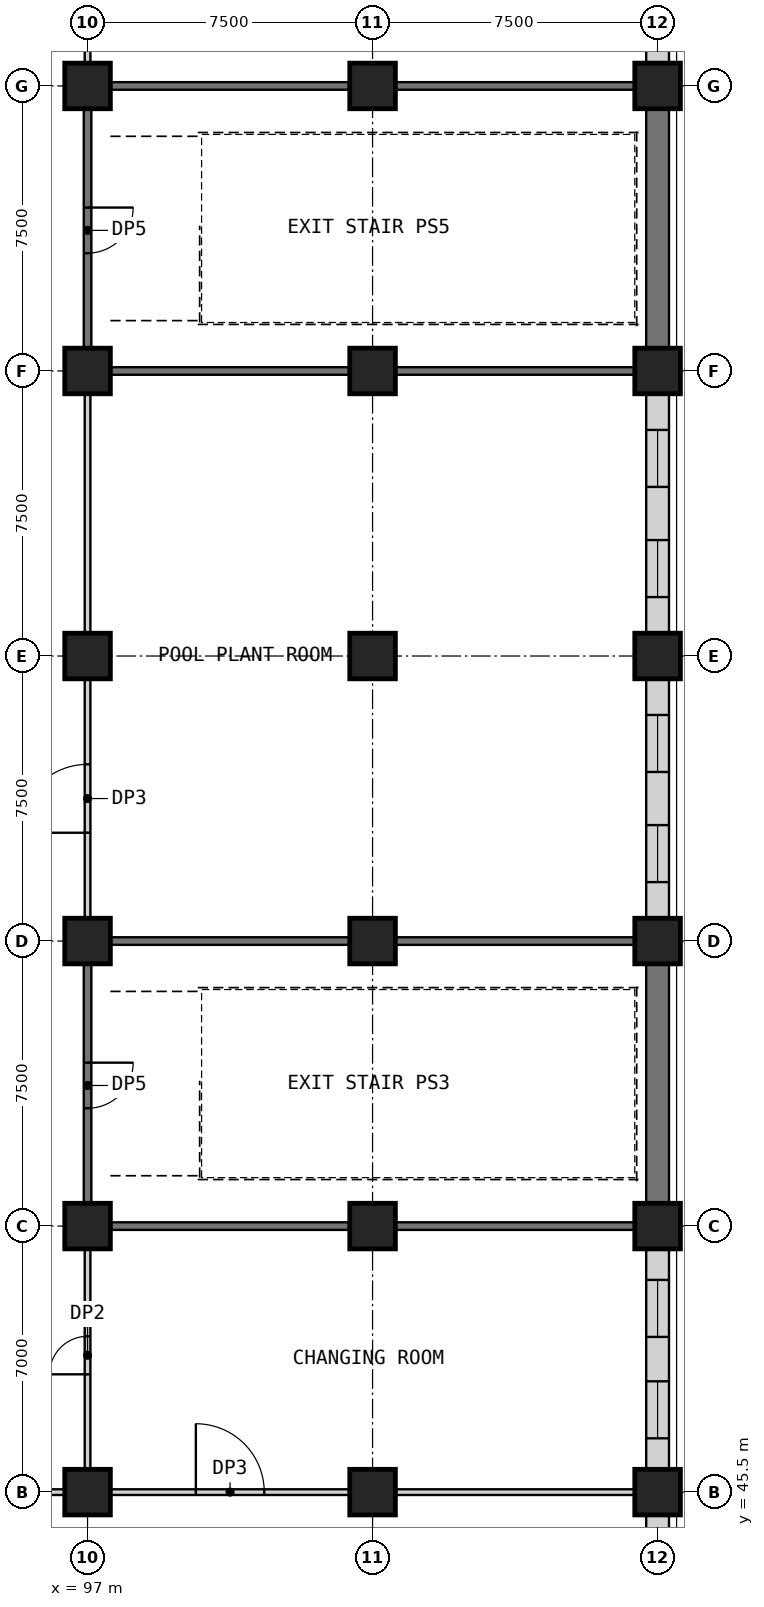
"""IFC4 building model, lengths in metres.
Left out: names, types, materials, properties, quantities, classifications, styles, units other than length and angle.
Written with IfcOpenShell. Run it as: python <this file> out.ifc"""

import sys

from ifc_helpers import new_model, si_unit, direction, frame, frame_2d, origin, origin_2d, place, context, subcontext, project, spatial, rectangle, extrude, element, fill, save


model = new_model("IFC4")
c1 = context("Model", 3, precision=1e-05, world=origin(), true_north=direction((0.0, 1.0)))
c2 = subcontext(c1, "Body", "Model", "MODEL_VIEW")
j1 = project(units=[si_unit("LENGTHUNIT", "METRE"), si_unit("PLANEANGLEUNIT", "RADIAN")], contexts=[c1])
p1 = place(None, origin())
s1 = spatial("IfcSite", under=j1, at=p1, CompositionType="ELEMENT")
p2 = place(p1, origin())
s2 = spatial("IfcBuilding", under=s1, at=p2, CompositionType="ELEMENT")
p3 = place(p2, frame((0.0, 0.0, 29.0)))
s3 = spatial("IfcBuildingStorey", under=s2, at=p3, CompositionType="ELEMENT", Elevation=29.0)
for number, where, z_axis, x_axis in (
    (1, (97.0, 45.5, 0.0), (0.0, 0.0, 1.0), (1.0, 0.0, 0.0)),
    (2, (97.0, 52.5, 0.0), (0.0, 0.0, 1.0), (1.0, 0.0, 0.0)),
    (3, (97.0, 60.0, 0.0), (0.0, 0.0, 1.0), (1.0, 0.0, 0.0)),
    (4, (97.0, 67.5, 0.0), (0.0, 0.0, 1.0), (1.0, 0.0, 0.0)),
    (5, (97.0, 75.0, 0.0), (0.0, 0.0, 1.0), (1.0, 0.0, 0.0)),
    (6, (97.0, 82.5, 0.0), (0.0, 0.0, 1.0), (1.0, 0.0, 0.0)),
    (7, (104.5, 45.5, 0.0), (0.0, 0.0, 1.0), (1.0, 0.0, 0.0)),
    (8, (104.5, 52.5, 0.0), (0.0, 0.0, 1.0), (1.0, 0.0, 0.0)),
    (9, (104.5, 60.0, 0.0), (0.0, 0.0, 1.0), (1.0, 0.0, 0.0)),
    (10, (104.5, 67.5, 0.0), (0.0, 0.0, 1.0), (1.0, 0.0, 0.0)),
    (11, (104.5, 75.0, 0.0), (0.0, 0.0, 1.0), (1.0, 0.0, 0.0)),
    (12, (104.5, 82.5, 0.0), (0.0, 0.0, 1.0), (1.0, 0.0, 0.0)),
    (13, (112.0, 45.5, 0.0), (0.0, 0.0, 1.0), (1.0, 0.0, 0.0)),
    (14, (112.0, 52.5, 0.0), (0.0, 0.0, 1.0), (1.0, 0.0, 0.0)),
    (15, (112.0, 60.0, 0.0), (0.0, 0.0, 1.0), (1.0, 0.0, 0.0)),
    (16, (112.0, 67.5, 0.0), (0.0, 0.0, 1.0), (1.0, 0.0, 0.0)),
    (17, (112.0, 75.0, 0.0), (0.0, 0.0, 1.0), (1.0, 0.0, 0.0)),
    (18, (112.0, 82.5, 0.0), (0.0, 0.0, 1.0), (1.0, 0.0, 0.0)),
):
    element("IfcColumn", number, at=place(p3, frame(where, z_axis=z_axis, x_axis=x_axis)), inside=s3, PredefinedType="COLUMN", context=c2, shape_type="SweptSolid", body=[
        extrude(rectangle(XDim=1.2, YDim=1.2, at=origin_2d()), origin(), (0.0, 0.0, 1.0), 5.0),
    ])
p4 = place(p3, frame((90.0, 45.5, 0.0), z_axis=(0.0, 0.0, 1.0), x_axis=(1.0, 0.0, 0.0)))
e19 = element("IfcWall", 19, at=p4, inside=s3, PredefinedType="PARTITIONING", context=c2, shape_type="SweptSolid", body=[
    extrude(rectangle(XDim=6.4, YDim=0.15, at=frame_2d((3.2, 0.0))), origin(), (0.0, 0.0, 1.0), 4.7),
])
p5 = place(p3, frame((97.6, 45.5, 0.0), z_axis=(0.0, 0.0, 1.0), x_axis=(1.0, 0.0, 0.0)))
e20 = element("IfcWall", 20, at=p5, inside=s3, PredefinedType="PARTITIONING", context=c2, shape_type="SweptSolid", body=[
    extrude(rectangle(XDim=6.3, YDim=0.15, at=frame_2d((3.15, 0.0))), origin(), (0.0, 0.0, 1.0), 4.7),
])
p6 = place(p5, frame((2.25, 0.0, 0.0)))
e21 = element("IfcOpeningElement", 21, at=p6, cuts=e20, PredefinedType="OPENING", context=c2, shape_type="SweptSolid", body=[
    extrude(rectangle(XDim=1.8, YDim=2.4, at=frame_2d((0.9, 1.2))), frame((0.0, 0.085, 0.0), z_axis=(0.0, -1.0, 0.0), x_axis=(1.0, 0.0, 0.0)), (0.0, 0.0, 1.0), 0.17),
])
p7 = place(p3, frame((105.1, 45.5, 0.0), z_axis=(0.0, 0.0, 1.0), x_axis=(1.0, 0.0, 0.0)))
e22 = element("IfcWall", 22, at=p7, inside=s3, PredefinedType="PARTITIONING", context=c2, shape_type="SweptSolid", body=[
    extrude(rectangle(XDim=6.3, YDim=0.15, at=frame_2d((3.15, 0.0))), origin(), (0.0, 0.0, 1.0), 4.7),
])
for number, where, z_axis, x_axis in (
    (23, (97.6, 52.5, 0.0), (0.0, 0.0, 1.0), (1.0, 0.0, 0.0)),
    (24, (105.1, 52.5, 0.0), (0.0, 0.0, 1.0), (1.0, 0.0, 0.0)),
    (25, (97.6, 60.0, 0.0), (0.0, 0.0, 1.0), (1.0, 0.0, 0.0)),
    (26, (105.1, 60.0, 0.0), (0.0, 0.0, 1.0), (1.0, 0.0, 0.0)),
    (27, (97.6, 75.0, 0.0), (0.0, 0.0, 1.0), (1.0, 0.0, 0.0)),
    (28, (105.1, 75.0, 0.0), (0.0, 0.0, 1.0), (1.0, 0.0, 0.0)),
    (29, (97.6, 82.5, 0.0), (0.0, 0.0, 1.0), (1.0, 0.0, 0.0)),
    (30, (105.1, 82.5, 0.0), (0.0, 0.0, 1.0), (1.0, 0.0, 0.0)),
):
    element("IfcWall", number, at=place(p3, frame(where, z_axis=z_axis, x_axis=x_axis)), inside=s3, PredefinedType="SHEAR", context=c2, shape_type="SweptSolid", body=[
        extrude(rectangle(XDim=6.3, YDim=0.2, at=frame_2d((3.15, 0.0))), origin(), (0.0, 0.0, 1.0), 4.7),
    ])
p8 = place(p3, frame((97.0, 46.1, 0.0), z_axis=(0.0, 0.0, 1.0), x_axis=(0.0, 1.0, 0.0)))
e31 = element("IfcWall", 31, at=p8, inside=s3, PredefinedType="PARTITIONING", context=c2, shape_type="SweptSolid", body=[
    extrude(rectangle(XDim=5.8, YDim=0.15, at=frame_2d((2.9, 0.0))), origin(), (0.0, 0.0, 1.0), 4.7),
])
p9 = place(p8, frame((2.5, 0.0, 0.0)))
e32 = element("IfcOpeningElement", 32, at=p9, cuts=e31, PredefinedType="OPENING", context=c2, shape_type="SweptSolid", body=[
    extrude(rectangle(XDim=1.0, YDim=2.1, at=frame_2d((0.5, 1.05))), frame((0.0, 0.085, 0.0), z_axis=(0.0, -1.0, 0.0), x_axis=(1.0, 0.0, 0.0)), (0.0, 0.0, 1.0), 0.17),
])
p10 = place(p3, frame((97.0, 59.4, 0.0), z_axis=(0.0, 0.0, 1.0), x_axis=(0.0, -1.0, 0.0)))
e33 = element("IfcWall", 33, at=p10, inside=s3, PredefinedType="SHEAR", context=c2, shape_type="SweptSolid", body=[
    extrude(rectangle(XDim=6.3, YDim=0.2, at=frame_2d((3.15, 0.0))), origin(), (0.0, 0.0, 1.0), 4.7),
])
p11 = place(p10, frame((2.6, 0.0, 0.0)))
e34 = element("IfcOpeningElement", 34, at=p11, cuts=e33, PredefinedType="OPENING", context=c2, shape_type="SweptSolid", body=[
    extrude(rectangle(XDim=1.2, YDim=2.1, at=frame_2d((0.6, 1.05))), frame((0.0, 0.11, 0.0), z_axis=(0.0, -1.0, 0.0), x_axis=(1.0, 0.0, 0.0)), (0.0, 0.0, 1.0), 0.22),
])
p12 = place(p3, frame((97.0, 60.6, 0.0), z_axis=(0.0, 0.0, 1.0), x_axis=(0.0, 1.0, 0.0)))
e35 = element("IfcWall", 35, at=p12, inside=s3, PredefinedType="PARTITIONING", context=c2, shape_type="SweptSolid", body=[
    extrude(rectangle(XDim=6.3, YDim=0.15, at=frame_2d((3.15, 0.0))), origin(), (0.0, 0.0, 1.0), 4.7),
])
p13 = place(p12, frame((2.25, 0.0, 0.0)))
e36 = element("IfcOpeningElement", 36, at=p13, cuts=e35, PredefinedType="OPENING", context=c2, shape_type="SweptSolid", body=[
    extrude(rectangle(XDim=1.8, YDim=2.4, at=frame_2d((0.9, 1.2))), frame((0.0, 0.085, 0.0), z_axis=(0.0, -1.0, 0.0), x_axis=(1.0, 0.0, 0.0)), (0.0, 0.0, 1.0), 0.17),
])
p14 = place(p3, frame((97.0, 68.1, 0.0), z_axis=(0.0, 0.0, 1.0), x_axis=(0.0, 1.0, 0.0)))
e37 = element("IfcWall", 37, at=p14, inside=s3, PredefinedType="PARTITIONING", context=c2, shape_type="SweptSolid", body=[
    extrude(rectangle(XDim=6.3, YDim=0.15, at=frame_2d((3.15, 0.0))), origin(), (0.0, 0.0, 1.0), 4.7),
])
p15 = place(p3, frame((97.0, 81.9, 0.0), z_axis=(0.0, 0.0, 1.0), x_axis=(0.0, -1.0, 0.0)))
e38 = element("IfcWall", 38, at=p15, inside=s3, PredefinedType="SHEAR", context=c2, shape_type="SweptSolid", body=[
    extrude(rectangle(XDim=6.3, YDim=0.2, at=frame_2d((3.15, 0.0))), origin(), (0.0, 0.0, 1.0), 4.7),
])
p16 = place(p15, frame((2.6, 0.0, 0.0)))
e39 = element("IfcOpeningElement", 39, at=p16, cuts=e38, PredefinedType="OPENING", context=c2, shape_type="SweptSolid", body=[
    extrude(rectangle(XDim=1.2, YDim=2.1, at=frame_2d((0.6, 1.05))), frame((0.0, 0.11, 0.0), z_axis=(0.0, -1.0, 0.0), x_axis=(1.0, 0.0, 0.0)), (0.0, 0.0, 1.0), 0.22),
])
p17 = place(p3, frame((97.0, 83.1, 0.0), z_axis=(0.0, 0.0, 1.0), x_axis=(0.0, 1.0, 0.0)))
e40 = element("IfcWall", 40, at=p17, inside=s3, PredefinedType="PARTITIONING", context=c2, shape_type="SweptSolid", body=[
    extrude(rectangle(XDim=6.3, YDim=0.15, at=frame_2d((3.15, 0.0))), origin(), (0.0, 0.0, 1.0), 4.7),
])
p18 = place(p17, frame((2.25, 0.0, 0.0)))
e41 = element("IfcOpeningElement", 41, at=p18, cuts=e40, PredefinedType="OPENING", context=c2, shape_type="SweptSolid", body=[
    extrude(rectangle(XDim=1.8, YDim=2.4, at=frame_2d((0.9, 1.2))), frame((0.0, 0.085, 0.0), z_axis=(0.0, -1.0, 0.0), x_axis=(1.0, 0.0, 0.0)), (0.0, 0.0, 1.0), 0.17),
])
p19 = place(p3, frame((112.0, 38.6, 0.0), z_axis=(0.0, 0.0, 1.0), x_axis=(0.0, 1.0, 0.0)))
e42 = element("IfcWall", 42, at=p19, inside=s3, PredefinedType="PARTITIONING", context=c2, shape_type="SweptSolid", body=[
    extrude(rectangle(XDim=6.3, YDim=0.6, at=frame_2d((3.15, 0.0))), origin(), (0.0, 0.0, 1.0), 4.7),
])
p20 = place(p19, frame((0.951, 0.0, 0.9)))
e43 = element("IfcOpeningElement", 43, at=p20, cuts=e42, PredefinedType="OPENING", context=c2, shape_type="SweptSolid", body=[
    extrude(rectangle(XDim=1.5, YDim=2.8, at=frame_2d((0.75, 1.4))), frame((0.0, 0.31, 0.0), z_axis=(0.0, -1.0, 0.0), x_axis=(1.0, 0.0, 0.0)), (0.0, 0.0, 1.0), 0.62),
])
p21 = place(p19, frame((3.849, 0.0, 0.9)))
e44 = element("IfcOpeningElement", 44, at=p21, cuts=e42, PredefinedType="OPENING", context=c2, shape_type="SweptSolid", body=[
    extrude(rectangle(XDim=1.5, YDim=2.8, at=frame_2d((0.75, 1.4))), frame((0.0, 0.31, 0.0), z_axis=(0.0, -1.0, 0.0), x_axis=(1.0, 0.0, 0.0)), (0.0, 0.0, 1.0), 0.62),
])
p22 = place(p3, frame((112.0, 46.1, 0.0), z_axis=(0.0, 0.0, 1.0), x_axis=(0.0, 1.0, 0.0)))
e45 = element("IfcWall", 45, at=p22, inside=s3, PredefinedType="PARTITIONING", context=c2, shape_type="SweptSolid", body=[
    extrude(rectangle(XDim=5.8, YDim=0.6, at=frame_2d((2.9, 0.0))), origin(), (0.0, 0.0, 1.0), 4.7),
])
p23 = place(p22, frame((0.816, 0.0, 0.9)))
e46 = element("IfcOpeningElement", 46, at=p23, cuts=e45, PredefinedType="OPENING", context=c2, shape_type="SweptSolid", body=[
    extrude(rectangle(XDim=1.5, YDim=2.8, at=frame_2d((0.75, 1.4))), frame((0.0, 0.31, 0.0), z_axis=(0.0, -1.0, 0.0), x_axis=(1.0, 0.0, 0.0)), (0.0, 0.0, 1.0), 0.62),
])
p24 = place(p22, frame((3.484, 0.0, 0.9)))
e47 = element("IfcOpeningElement", 47, at=p24, cuts=e45, PredefinedType="OPENING", context=c2, shape_type="SweptSolid", body=[
    extrude(rectangle(XDim=1.5, YDim=2.8, at=frame_2d((0.75, 1.4))), frame((0.0, 0.31, 0.0), z_axis=(0.0, -1.0, 0.0), x_axis=(1.0, 0.0, 0.0)), (0.0, 0.0, 1.0), 0.62),
])
p25 = place(p3, frame((112.0, 53.1, 0.0), z_axis=(0.0, 0.0, 1.0), x_axis=(0.0, 1.0, 0.0)))
e48 = element("IfcWall", 48, at=p25, inside=s3, PredefinedType="PARTITIONING", context=c2, shape_type="SweptSolid", body=[
    extrude(rectangle(XDim=6.3, YDim=0.6, at=frame_2d((3.15, 0.0))), origin(), (0.0, 0.0, 1.0), 4.7),
])
p26 = place(p3, frame((112.0, 60.6, 0.0), z_axis=(0.0, 0.0, 1.0), x_axis=(0.0, 1.0, 0.0)))
e49 = element("IfcWall", 49, at=p26, inside=s3, PredefinedType="PARTITIONING", context=c2, shape_type="SweptSolid", body=[
    extrude(rectangle(XDim=6.3, YDim=0.6, at=frame_2d((3.15, 0.0))), origin(), (0.0, 0.0, 1.0), 4.7),
])
p27 = place(p26, frame((0.951, 0.0, 0.9)))
e50 = element("IfcOpeningElement", 50, at=p27, cuts=e49, PredefinedType="OPENING", context=c2, shape_type="SweptSolid", body=[
    extrude(rectangle(XDim=1.5, YDim=2.8, at=frame_2d((0.75, 1.4))), frame((0.0, 0.31, 0.0), z_axis=(0.0, -1.0, 0.0), x_axis=(1.0, 0.0, 0.0)), (0.0, 0.0, 1.0), 0.62),
])
p28 = place(p26, frame((3.849, 0.0, 0.9)))
e51 = element("IfcOpeningElement", 51, at=p28, cuts=e49, PredefinedType="OPENING", context=c2, shape_type="SweptSolid", body=[
    extrude(rectangle(XDim=1.5, YDim=2.8, at=frame_2d((0.75, 1.4))), frame((0.0, 0.31, 0.0), z_axis=(0.0, -1.0, 0.0), x_axis=(1.0, 0.0, 0.0)), (0.0, 0.0, 1.0), 0.62),
])
p29 = place(p3, frame((112.0, 68.1, 0.0), z_axis=(0.0, 0.0, 1.0), x_axis=(0.0, 1.0, 0.0)))
e52 = element("IfcWall", 52, at=p29, inside=s3, PredefinedType="PARTITIONING", context=c2, shape_type="SweptSolid", body=[
    extrude(rectangle(XDim=6.3, YDim=0.6, at=frame_2d((3.15, 0.0))), origin(), (0.0, 0.0, 1.0), 4.7),
])
p30 = place(p29, frame((0.951, 0.0, 0.9)))
e53 = element("IfcOpeningElement", 53, at=p30, cuts=e52, PredefinedType="OPENING", context=c2, shape_type="SweptSolid", body=[
    extrude(rectangle(XDim=1.5, YDim=2.8, at=frame_2d((0.75, 1.4))), frame((0.0, 0.31, 0.0), z_axis=(0.0, -1.0, 0.0), x_axis=(1.0, 0.0, 0.0)), (0.0, 0.0, 1.0), 0.62),
])
p31 = place(p29, frame((3.849, 0.0, 0.9)))
e54 = element("IfcOpeningElement", 54, at=p31, cuts=e52, PredefinedType="OPENING", context=c2, shape_type="SweptSolid", body=[
    extrude(rectangle(XDim=1.5, YDim=2.8, at=frame_2d((0.75, 1.4))), frame((0.0, 0.31, 0.0), z_axis=(0.0, -1.0, 0.0), x_axis=(1.0, 0.0, 0.0)), (0.0, 0.0, 1.0), 0.62),
])
p32 = place(p3, frame((112.0, 75.6, 0.0), z_axis=(0.0, 0.0, 1.0), x_axis=(0.0, 1.0, 0.0)))
e55 = element("IfcWall", 55, at=p32, inside=s3, PredefinedType="PARTITIONING", context=c2, shape_type="SweptSolid", body=[
    extrude(rectangle(XDim=6.3, YDim=0.6, at=frame_2d((3.15, 0.0))), origin(), (0.0, 0.0, 1.0), 4.7),
])
p33 = place(p3, frame((112.0, 83.1, 0.0), z_axis=(0.0, 0.0, 1.0), x_axis=(0.0, 1.0, 0.0)))
e56 = element("IfcWall", 56, at=p33, inside=s3, PredefinedType="PARTITIONING", context=c2, shape_type="SweptSolid", body=[
    extrude(rectangle(XDim=6.3, YDim=0.6, at=frame_2d((3.15, 0.0))), origin(), (0.0, 0.0, 1.0), 4.7),
])
p34 = place(p33, frame((0.951, 0.0, 0.9)))
e57 = element("IfcOpeningElement", 57, at=p34, cuts=e56, PredefinedType="OPENING", context=c2, shape_type="SweptSolid", body=[
    extrude(rectangle(XDim=1.5, YDim=2.8, at=frame_2d((0.75, 1.4))), frame((0.0, 0.31, 0.0), z_axis=(0.0, -1.0, 0.0), x_axis=(1.0, 0.0, 0.0)), (0.0, 0.0, 1.0), 0.62),
])
p35 = place(p33, frame((3.849, 0.0, 0.9)))
e58 = element("IfcOpeningElement", 58, at=p35, cuts=e56, PredefinedType="OPENING", context=c2, shape_type="SweptSolid", body=[
    extrude(rectangle(XDim=1.5, YDim=2.8, at=frame_2d((0.75, 1.4))), frame((0.0, 0.31, 0.0), z_axis=(0.0, -1.0, 0.0), x_axis=(1.0, 0.0, 0.0)), (0.0, 0.0, 1.0), 0.62),
])
p36 = place(p6, origin())
e59 = element("IfcDoor", 59, at=p36, inside=s3, OperationType="SINGLE_SWING_LEFT", PredefinedType="DOOR", context=c2, shape_type="SweptSolid", body=[
    extrude(rectangle(XDim=1.8, YDim=2.4, at=frame_2d((0.9, 1.2))), frame((0.0, 0.025, 0.0), z_axis=(0.0, -1.0, 0.0), x_axis=(1.0, 0.0, 0.0)), (0.0, 0.0, 1.0), 0.05),
])
fill(e21, e59)
p37 = place(p9, origin())
e60 = element("IfcDoor", 60, at=p37, inside=s3, OperationType="SINGLE_SWING_LEFT", PredefinedType="DOOR", context=c2, shape_type="SweptSolid", body=[
    extrude(rectangle(XDim=1.0, YDim=2.1, at=frame_2d((0.5, 1.05))), frame((0.0, 0.025, 0.0), z_axis=(0.0, -1.0, 0.0), x_axis=(1.0, 0.0, 0.0)), (0.0, 0.0, 1.0), 0.05),
])
fill(e32, e60)
p38 = place(p11, origin())
e61 = element("IfcDoor", 61, at=p38, inside=s3, OperationType="SINGLE_SWING_LEFT", PredefinedType="DOOR", context=c2, shape_type="SweptSolid", body=[
    extrude(rectangle(XDim=1.2, YDim=2.1, at=frame_2d((0.6, 1.05))), frame((0.0, 0.025, 0.0), z_axis=(0.0, -1.0, 0.0), x_axis=(1.0, 0.0, 0.0)), (0.0, 0.0, 1.0), 0.05),
])
fill(e34, e61)
p39 = place(p13, origin())
e62 = element("IfcDoor", 62, at=p39, inside=s3, OperationType="SINGLE_SWING_LEFT", PredefinedType="DOOR", context=c2, shape_type="SweptSolid", body=[
    extrude(rectangle(XDim=1.8, YDim=2.4, at=frame_2d((0.9, 1.2))), frame((0.0, 0.025, 0.0), z_axis=(0.0, -1.0, 0.0), x_axis=(1.0, 0.0, 0.0)), (0.0, 0.0, 1.0), 0.05),
])
fill(e36, e62)
p40 = place(p16, origin())
e63 = element("IfcDoor", 63, at=p40, inside=s3, OperationType="SINGLE_SWING_LEFT", PredefinedType="DOOR", context=c2, shape_type="SweptSolid", body=[
    extrude(rectangle(XDim=1.2, YDim=2.1, at=frame_2d((0.6, 1.05))), frame((0.0, 0.025, 0.0), z_axis=(0.0, -1.0, 0.0), x_axis=(1.0, 0.0, 0.0)), (0.0, 0.0, 1.0), 0.05),
])
fill(e39, e63)
p41 = place(p23, origin())
e64 = element("IfcWindow", 64, at=p41, inside=s3, PartitioningType="SINGLE_PANEL", PredefinedType="WINDOW", context=c2, shape_type="SweptSolid", body=[
    extrude(rectangle(XDim=1.5, YDim=2.8, at=frame_2d((0.75, 1.4))), frame((0.0, 0.03, 0.0), z_axis=(0.0, -1.0, 0.0), x_axis=(1.0, 0.0, 0.0)), (0.0, 0.0, 1.0), 0.06),
])
fill(e46, e64)
p42 = place(p24, origin())
e65 = element("IfcWindow", 65, at=p42, inside=s3, PartitioningType="SINGLE_PANEL", PredefinedType="WINDOW", context=c2, shape_type="SweptSolid", body=[
    extrude(rectangle(XDim=1.5, YDim=2.8, at=frame_2d((0.75, 1.4))), frame((0.0, 0.03, 0.0), z_axis=(0.0, -1.0, 0.0), x_axis=(1.0, 0.0, 0.0)), (0.0, 0.0, 1.0), 0.06),
])
fill(e47, e65)
p43 = place(p27, origin())
e66 = element("IfcWindow", 66, at=p43, inside=s3, PartitioningType="SINGLE_PANEL", PredefinedType="WINDOW", context=c2, shape_type="SweptSolid", body=[
    extrude(rectangle(XDim=1.5, YDim=2.8, at=frame_2d((0.75, 1.4))), frame((0.0, 0.03, 0.0), z_axis=(0.0, -1.0, 0.0), x_axis=(1.0, 0.0, 0.0)), (0.0, 0.0, 1.0), 0.06),
])
fill(e50, e66)
p44 = place(p28, origin())
e67 = element("IfcWindow", 67, at=p44, inside=s3, PartitioningType="SINGLE_PANEL", PredefinedType="WINDOW", context=c2, shape_type="SweptSolid", body=[
    extrude(rectangle(XDim=1.5, YDim=2.8, at=frame_2d((0.75, 1.4))), frame((0.0, 0.03, 0.0), z_axis=(0.0, -1.0, 0.0), x_axis=(1.0, 0.0, 0.0)), (0.0, 0.0, 1.0), 0.06),
])
fill(e51, e67)
p45 = place(p30, origin())
e68 = element("IfcWindow", 68, at=p45, inside=s3, PartitioningType="SINGLE_PANEL", PredefinedType="WINDOW", context=c2, shape_type="SweptSolid", body=[
    extrude(rectangle(XDim=1.5, YDim=2.8, at=frame_2d((0.75, 1.4))), frame((0.0, 0.03, 0.0), z_axis=(0.0, -1.0, 0.0), x_axis=(1.0, 0.0, 0.0)), (0.0, 0.0, 1.0), 0.06),
])
fill(e53, e68)
p46 = place(p31, origin())
e69 = element("IfcWindow", 69, at=p46, inside=s3, PartitioningType="SINGLE_PANEL", PredefinedType="WINDOW", context=c2, shape_type="SweptSolid", body=[
    extrude(rectangle(XDim=1.5, YDim=2.8, at=frame_2d((0.75, 1.4))), frame((0.0, 0.03, 0.0), z_axis=(0.0, -1.0, 0.0), x_axis=(1.0, 0.0, 0.0)), (0.0, 0.0, 1.0), 0.06),
])
fill(e54, e69)
save(model, sys.argv[1])
